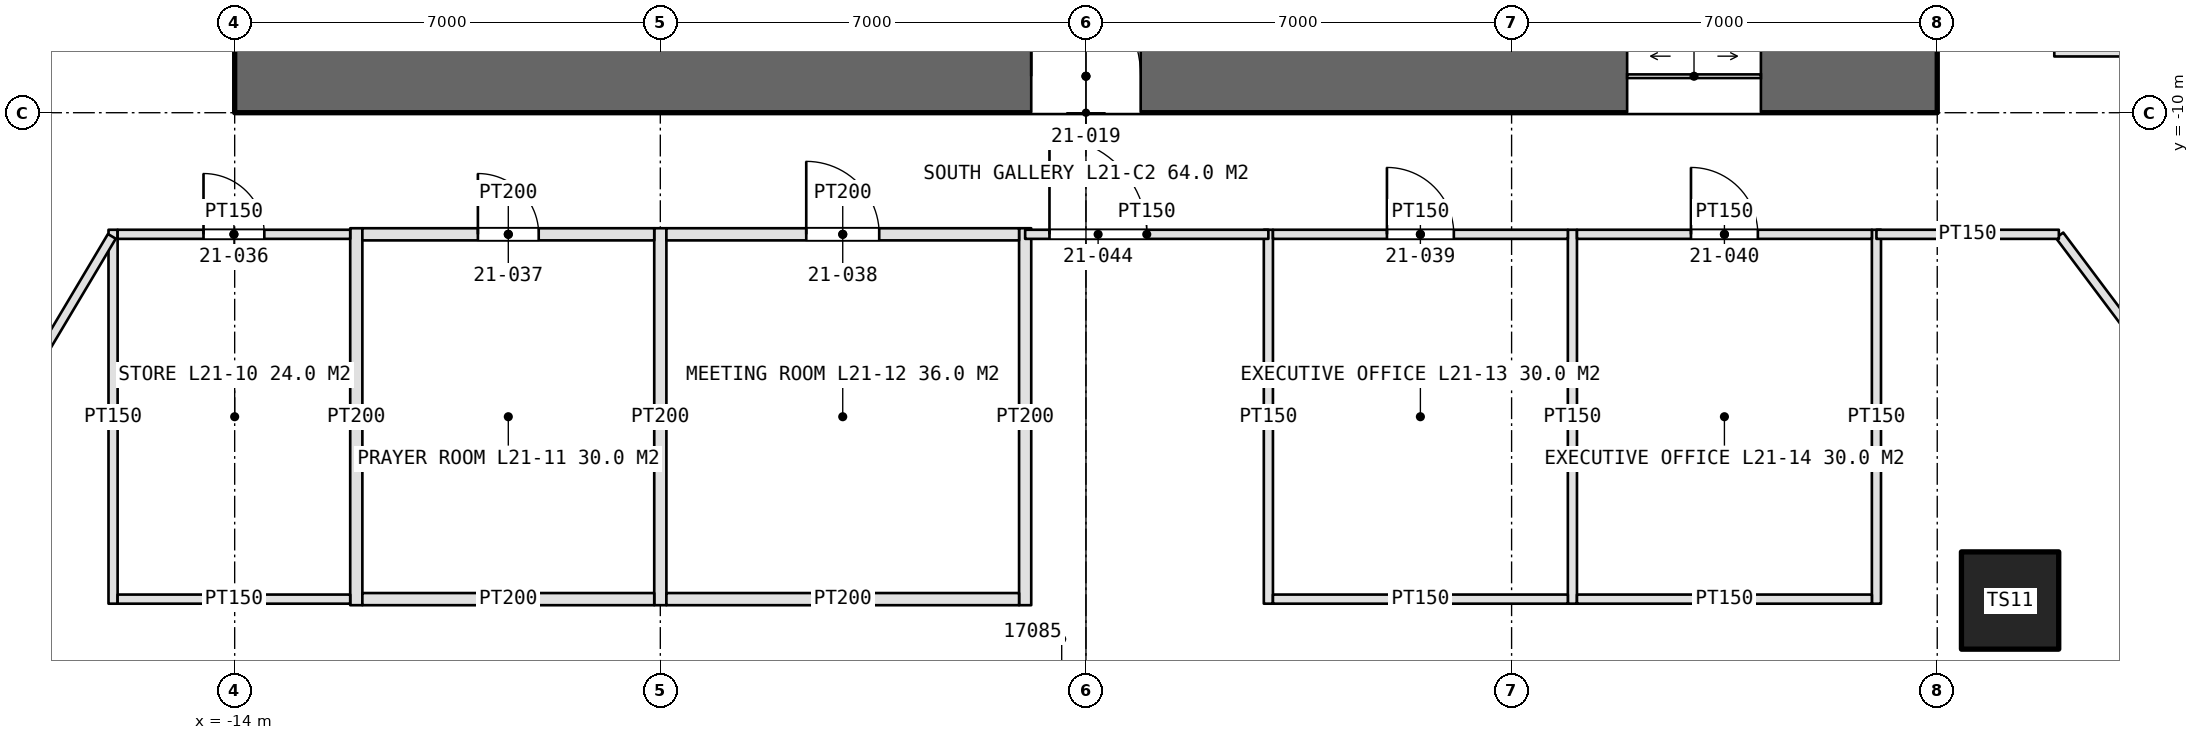
"""IFC4 building model, lengths in metres.
Left out: names, types, materials, properties, quantities, classifications, styles, units other than length and angle.
Written with IfcOpenShell. Run it as: python <this file> out.ifc"""

import sys

from ifc_helpers import new_model, si_unit, direction, frame, frame_2d, origin, origin_2d, place, context, subcontext, project, spatial, rectangle, hollow_rectangle, extrude, element, fill, save


model = new_model("IFC4")
c1 = context("Model", 3, precision=1e-05, world=origin(), true_north=direction((0.0, 1.0)))
c2 = subcontext(c1, "Body", "Model", "MODEL_VIEW")
j1 = project(units=[si_unit("LENGTHUNIT", "METRE"), si_unit("PLANEANGLEUNIT", "RADIAN")], contexts=[c1])
p1 = place(None, origin())
s1 = spatial("IfcSite", under=j1, at=p1, CompositionType="ELEMENT")
p2 = place(p1, origin())
s2 = spatial("IfcBuilding", under=s1, at=p2, CompositionType="ELEMENT")
p3 = place(p2, frame((0.0, 0.0, 105.0)))
s3 = spatial("IfcBuildingStorey", under=s2, at=p3, CompositionType="ELEMENT", Elevation=105.0)
p4 = place(p3, frame((-14.0, -9.4, 0.0), z_axis=(0.0, 0.0, 1.0), x_axis=(1.0, 0.0, 0.0)))
e1 = element("IfcWall", 1, at=p4, inside=s3, PredefinedType="SHEAR", context=c2, shape_type="SweptSolid", body=[
    extrude(rectangle(XDim=28.0, YDim=1.2, at=frame_2d((14.0, 0.0))), origin(), (0.0, 0.0, 1.0), 4.2),
])
p5 = place(p4, frame((13.1, 0.0, 0.0)))
e2 = element("IfcOpeningElement", 2, at=p5, cuts=e1, PredefinedType="OPENING", context=c2, shape_type="SweptSolid", body=[
    extrude(rectangle(XDim=1.8, YDim=2.4, at=frame_2d((0.9, 1.2))), frame((0.0, 0.61, 0.0), z_axis=(0.0, -1.0, 0.0), x_axis=(1.0, 0.0, 0.0)), (0.0, 0.0, 1.0), 1.22),
])
p6 = place(p4, frame((22.9, 0.0, 0.0)))
e3 = element("IfcOpeningElement", 3, at=p6, cuts=e1, PredefinedType="OPENING", context=c2, shape_type="SweptSolid", body=[
    extrude(rectangle(XDim=2.2, YDim=2.7, at=frame_2d((1.1, 1.35))), frame((0.0, 0.61, 0.0), z_axis=(0.0, -1.0, 0.0), x_axis=(1.0, 0.0, 0.0)), (0.0, 0.0, 1.0), 1.22),
])
p7 = place(p3, frame((15.198, -18.023, 0.975), z_axis=(0.0, 0.0, 1.0), x_axis=(1.0, 0.0, 0.0)))
e4 = element("IfcColumn", 4, at=p7, inside=s3, PredefinedType="COLUMN", context=c2, shape_type="SweptSolid", body=[
    extrude(hollow_rectangle(XDim=1.6, YDim=1.6, WallThickness=0.15, at=origin_2d()), origin(), (0.0, 0.0, 1.0), 3.225),
])
p8 = place(p3, frame((15.925, -9.0, 0.0), z_axis=(0.0, 0.0, 1.0), x_axis=(1.0, 0.0, 0.0)))
e5 = element("IfcWall", 5, at=p8, inside=s3, PredefinedType="PARTITIONING", context=c2, shape_type="SweptSolid", body=[
    extrude(rectangle(XDim=7.15, YDim=0.15, at=frame_2d((3.575, 0.0))), origin(), (0.0, 0.0, 1.0), 3.0),
])
p9 = place(p3, frame((-16.0, -11.925, 0.0), z_axis=(0.0, 0.0, 1.0), x_axis=(0.0, -1.0, 0.0)))
e6 = element("IfcWall", 6, at=p9, inside=s3, PredefinedType="PARTITIONING", context=c2, shape_type="SweptSolid", body=[
    extrude(rectangle(XDim=6.15, YDim=0.15, at=frame_2d((3.075, 0.0))), origin(), (0.0, 0.0, 1.0), 3.0),
])
for number, where, z_axis, x_axis in (
    (7, (-12.0, -11.9, 0.0), (0.0, 0.0, 1.0), (0.0, -1.0, 0.0)),
    (8, (-7.0, -11.9, 0.0), (0.0, 0.0, 1.0), (0.0, -1.0, 0.0)),
    (9, (-1.0, -11.9, 0.0), (0.0, 0.0, 1.0), (0.0, -1.0, 0.0)),
):
    element("IfcWall", number, at=place(p3, frame(where, z_axis=z_axis, x_axis=x_axis)), inside=s3, PredefinedType="PARTITIONING", context=c2, shape_type="SweptSolid", body=[
        extrude(rectangle(XDim=6.2, YDim=0.2, at=frame_2d((3.1, 0.0))), origin(), (0.0, 0.0, 1.0), 3.0),
    ])
p10 = place(p3, frame((-15.925, -12.0, 0.0), z_axis=(0.0, 0.0, 1.0), x_axis=(1.0, 0.0, 0.0)))
e10 = element("IfcWall", 10, at=p10, inside=s3, PredefinedType="PARTITIONING", context=c2, shape_type="SweptSolid", body=[
    extrude(rectangle(XDim=3.825, YDim=0.15, at=frame_2d((1.913, 0.0))), origin(), (0.0, 0.0, 1.0), 3.0),
])
p11 = place(p10, frame((1.413, 0.0, 0.0)))
e11 = element("IfcOpeningElement", 11, at=p11, cuts=e10, PredefinedType="OPENING", context=c2, shape_type="SweptSolid", body=[
    extrude(rectangle(XDim=1.0, YDim=2.2, at=frame_2d((0.5, 1.1))), frame((0.0, 0.085, 0.0), z_axis=(0.0, -1.0, 0.0), x_axis=(1.0, 0.0, 0.0)), (0.0, 0.0, 1.0), 0.17),
])
p12 = place(p3, frame((-15.925, -18.0, 0.0), z_axis=(0.0, 0.0, 1.0), x_axis=(1.0, 0.0, 0.0)))
e12 = element("IfcWall", 12, at=p12, inside=s3, PredefinedType="PARTITIONING", context=c2, shape_type="SweptSolid", body=[
    extrude(rectangle(XDim=3.825, YDim=0.15, at=frame_2d((1.913, 0.0))), origin(), (0.0, 0.0, 1.0), 3.0),
])
p13 = place(p3, frame((-11.9, -12.0, 0.0), z_axis=(0.0, 0.0, 1.0), x_axis=(1.0, 0.0, 0.0)))
e13 = element("IfcWall", 13, at=p13, inside=s3, PredefinedType="PARTITIONING", context=c2, shape_type="SweptSolid", body=[
    extrude(rectangle(XDim=4.8, YDim=0.2, at=frame_2d((2.4, 0.0))), origin(), (0.0, 0.0, 1.0), 3.0),
])
p14 = place(p13, frame((1.9, 0.0, 0.0)))
e14 = element("IfcOpeningElement", 14, at=p14, cuts=e13, PredefinedType="OPENING", context=c2, shape_type="SweptSolid", body=[
    extrude(rectangle(XDim=1.0, YDim=2.2, at=frame_2d((0.5, 1.1))), frame((0.0, 0.11, 0.0), z_axis=(0.0, -1.0, 0.0), x_axis=(1.0, 0.0, 0.0)), (0.0, 0.0, 1.0), 0.22),
])
p15 = place(p3, frame((-11.9, -18.0, 0.0), z_axis=(0.0, 0.0, 1.0), x_axis=(1.0, 0.0, 0.0)))
e15 = element("IfcWall", 15, at=p15, inside=s3, PredefinedType="PARTITIONING", context=c2, shape_type="SweptSolid", body=[
    extrude(rectangle(XDim=4.8, YDim=0.2, at=frame_2d((2.4, 0.0))), origin(), (0.0, 0.0, 1.0), 3.0),
])
p16 = place(p3, frame((-6.9, -12.0, 0.0), z_axis=(0.0, 0.0, 1.0), x_axis=(1.0, 0.0, 0.0)))
e16 = element("IfcWall", 16, at=p16, inside=s3, PredefinedType="PARTITIONING", context=c2, shape_type="SweptSolid", body=[
    extrude(rectangle(XDim=5.8, YDim=0.2, at=frame_2d((2.9, 0.0))), origin(), (0.0, 0.0, 1.0), 3.0),
])
p17 = place(p16, frame((2.3, 0.0, 0.0)))
e17 = element("IfcOpeningElement", 17, at=p17, cuts=e16, PredefinedType="OPENING", context=c2, shape_type="SweptSolid", body=[
    extrude(rectangle(XDim=1.2, YDim=2.4, at=frame_2d((0.6, 1.2))), frame((0.0, 0.11, 0.0), z_axis=(0.0, -1.0, 0.0), x_axis=(1.0, 0.0, 0.0)), (0.0, 0.0, 1.0), 0.22),
])
p18 = place(p3, frame((-6.9, -18.0, 0.0), z_axis=(0.0, 0.0, 1.0), x_axis=(1.0, 0.0, 0.0)))
e18 = element("IfcWall", 18, at=p18, inside=s3, PredefinedType="PARTITIONING", context=c2, shape_type="SweptSolid", body=[
    extrude(rectangle(XDim=5.8, YDim=0.2, at=frame_2d((2.9, 0.0))), origin(), (0.0, 0.0, 1.0), 3.0),
])
for number, where, z_axis, x_axis in (
    (19, (3.0, -11.925, 0.0), (0.0, 0.0, 1.0), (0.0, -1.0, 0.0)),
    (20, (8.0, -11.925, 0.0), (0.0, 0.0, 1.0), (0.0, -1.0, 0.0)),
    (21, (13.0, -11.925, 0.0), (0.0, 0.0, 1.0), (0.0, -1.0, 0.0)),
):
    element("IfcWall", number, at=place(p3, frame(where, z_axis=z_axis, x_axis=x_axis)), inside=s3, PredefinedType="PARTITIONING", context=c2, shape_type="SweptSolid", body=[
        extrude(rectangle(XDim=6.15, YDim=0.15, at=frame_2d((3.075, 0.0))), origin(), (0.0, 0.0, 1.0), 3.0),
    ])
p19 = place(p3, frame((3.075, -12.0, 0.0), z_axis=(0.0, 0.0, 1.0), x_axis=(1.0, 0.0, 0.0)))
e22 = element("IfcWall", 22, at=p19, inside=s3, PredefinedType="PARTITIONING", context=c2, shape_type="SweptSolid", body=[
    extrude(rectangle(XDim=4.85, YDim=0.15, at=frame_2d((2.425, 0.0))), origin(), (0.0, 0.0, 1.0), 3.0),
])
p20 = place(p19, frame((1.875, 0.0, 0.0)))
e23 = element("IfcOpeningElement", 23, at=p20, cuts=e22, PredefinedType="OPENING", context=c2, shape_type="SweptSolid", body=[
    extrude(rectangle(XDim=1.1, YDim=2.3, at=frame_2d((0.55, 1.15))), frame((0.0, 0.085, 0.0), z_axis=(0.0, -1.0, 0.0), x_axis=(1.0, 0.0, 0.0)), (0.0, 0.0, 1.0), 0.17),
])
p21 = place(p3, frame((3.075, -18.0, 0.0), z_axis=(0.0, 0.0, 1.0), x_axis=(1.0, 0.0, 0.0)))
e24 = element("IfcWall", 24, at=p21, inside=s3, PredefinedType="PARTITIONING", context=c2, shape_type="SweptSolid", body=[
    extrude(rectangle(XDim=4.85, YDim=0.15, at=frame_2d((2.425, 0.0))), origin(), (0.0, 0.0, 1.0), 3.0),
])
p22 = place(p3, frame((8.075, -12.0, 0.0), z_axis=(0.0, 0.0, 1.0), x_axis=(1.0, 0.0, 0.0)))
e25 = element("IfcWall", 25, at=p22, inside=s3, PredefinedType="PARTITIONING", context=c2, shape_type="SweptSolid", body=[
    extrude(rectangle(XDim=4.85, YDim=0.15, at=frame_2d((2.425, 0.0))), origin(), (0.0, 0.0, 1.0), 3.0),
])
p23 = place(p22, frame((1.875, 0.0, 0.0)))
e26 = element("IfcOpeningElement", 26, at=p23, cuts=e25, PredefinedType="OPENING", context=c2, shape_type="SweptSolid", body=[
    extrude(rectangle(XDim=1.1, YDim=2.3, at=frame_2d((0.55, 1.15))), frame((0.0, 0.085, 0.0), z_axis=(0.0, -1.0, 0.0), x_axis=(1.0, 0.0, 0.0)), (0.0, 0.0, 1.0), 0.17),
])
p24 = place(p3, frame((8.075, -18.0, 0.0), z_axis=(0.0, 0.0, 1.0), x_axis=(1.0, 0.0, 0.0)))
e27 = element("IfcWall", 27, at=p24, inside=s3, PredefinedType="PARTITIONING", context=c2, shape_type="SweptSolid", body=[
    extrude(rectangle(XDim=4.85, YDim=0.15, at=frame_2d((2.425, 0.0))), origin(), (0.0, 0.0, 1.0), 3.0),
])
p25 = place(p3, frame((-16.02, -12.034, 0.0), z_axis=(0.0, 0.0, 1.0), x_axis=(-0.511518902153, -0.859272024879, 0.0)))
e28 = element("IfcWall", 28, at=p25, inside=s3, PredefinedType="PARTITIONING", context=c2, shape_type="SweptSolid", body=[
    extrude(rectangle(XDim=8.451, YDim=0.15, at=frame_2d((4.226, 0.0))), origin(), (0.0, 0.0, 1.0), 3.0),
])
p26 = place(p3, frame((16.012, -12.016, 0.0), z_axis=(0.0, 0.0, 1.0), x_axis=(0.600059749679, -0.799955184254, 0.0)))
e29 = element("IfcWall", 29, at=p26, inside=s3, PredefinedType="PARTITIONING", context=c2, shape_type="SweptSolid", body=[
    extrude(rectangle(XDim=7.191, YDim=0.15, at=frame_2d((3.596, 0.0))), origin(), (0.0, 0.0, 1.0), 3.0),
])
p27 = place(p3, frame((-1.0, -12.0, 0.0), z_axis=(0.0, 0.0, 1.0), x_axis=(1.0, 0.0, 0.0)))
e30 = element("IfcWall", 30, at=p27, inside=s3, PredefinedType="PARTITIONING", context=c2, shape_type="SweptSolid", body=[
    extrude(rectangle(XDim=4.0, YDim=0.15, at=frame_2d((2.0, 0.0))), origin(), (0.0, 0.0, 1.0), 3.0),
])
p28 = place(p27, frame((0.4, 0.0, 0.0)))
e31 = element("IfcOpeningElement", 31, at=p28, cuts=e30, PredefinedType="OPENING", context=c2, shape_type="SweptSolid", body=[
    extrude(rectangle(XDim=1.6, YDim=2.4, at=frame_2d((0.8, 1.2))), frame((0.0, 0.085, 0.0), z_axis=(0.0, -1.0, 0.0), x_axis=(1.0, 0.0, 0.0)), (0.0, 0.0, 1.0), 0.17),
])
p29 = place(p3, frame((13.0, -12.0, 0.0), z_axis=(0.0, 0.0, 1.0), x_axis=(1.0, 0.0, 0.0)))
e32 = element("IfcWall", 32, at=p29, inside=s3, PredefinedType="PARTITIONING", context=c2, shape_type="SweptSolid", body=[
    extrude(rectangle(XDim=3.0, YDim=0.15, at=frame_2d((1.5, 0.0))), origin(), (0.0, 0.0, 1.0), 3.0),
])
p30 = place(p5, origin())
e33 = element("IfcDoor", 33, at=p30, inside=s3, OperationType="DOUBLE_DOOR_SINGLE_SWING", PredefinedType="DOOR", context=c2, shape_type="SweptSolid", body=[
    extrude(rectangle(XDim=1.8, YDim=2.4, at=frame_2d((0.9, 1.2))), frame((0.0, 0.025, 0.0), z_axis=(0.0, -1.0, 0.0), x_axis=(1.0, 0.0, 0.0)), (0.0, 0.0, 1.0), 0.05),
])
fill(e2, e33)
p31 = place(p6, origin())
e34 = element("IfcDoor", 34, at=p31, inside=s3, OperationType="DOUBLE_DOOR_SLIDING", PredefinedType="DOOR", context=c2, shape_type="SweptSolid", body=[
    extrude(rectangle(XDim=2.2, YDim=2.7, at=frame_2d((1.1, 1.35))), frame((0.0, 0.025, 0.0), z_axis=(0.0, -1.0, 0.0), x_axis=(1.0, 0.0, 0.0)), (0.0, 0.0, 1.0), 0.05),
])
fill(e3, e34)
p32 = place(p11, origin())
e35 = element("IfcDoor", 35, at=p32, inside=s3, OperationType="SINGLE_SWING_LEFT", PredefinedType="DOOR", context=c2, shape_type="SweptSolid", body=[
    extrude(rectangle(XDim=1.0, YDim=2.2, at=frame_2d((0.5, 1.1))), frame((0.0, 0.025, 0.0), z_axis=(0.0, -1.0, 0.0), x_axis=(1.0, 0.0, 0.0)), (0.0, 0.0, 1.0), 0.05),
])
fill(e11, e35)
p33 = place(p14, origin())
e36 = element("IfcDoor", 36, at=p33, inside=s3, OperationType="SINGLE_SWING_LEFT", PredefinedType="DOOR", context=c2, shape_type="SweptSolid", body=[
    extrude(rectangle(XDim=1.0, YDim=2.2, at=frame_2d((0.5, 1.1))), frame((0.0, 0.025, 0.0), z_axis=(0.0, -1.0, 0.0), x_axis=(1.0, 0.0, 0.0)), (0.0, 0.0, 1.0), 0.05),
])
fill(e14, e36)
p34 = place(p17, origin())
e37 = element("IfcDoor", 37, at=p34, inside=s3, OperationType="SINGLE_SWING_LEFT", PredefinedType="DOOR", context=c2, shape_type="SweptSolid", body=[
    extrude(rectangle(XDim=1.2, YDim=2.4, at=frame_2d((0.6, 1.2))), frame((0.0, 0.025, 0.0), z_axis=(0.0, -1.0, 0.0), x_axis=(1.0, 0.0, 0.0)), (0.0, 0.0, 1.0), 0.05),
])
fill(e17, e37)
p35 = place(p20, origin())
e38 = element("IfcDoor", 38, at=p35, inside=s3, OperationType="SINGLE_SWING_LEFT", PredefinedType="DOOR", context=c2, shape_type="SweptSolid", body=[
    extrude(rectangle(XDim=1.1, YDim=2.3, at=frame_2d((0.55, 1.15))), frame((0.0, 0.025, 0.0), z_axis=(0.0, -1.0, 0.0), x_axis=(1.0, 0.0, 0.0)), (0.0, 0.0, 1.0), 0.05),
])
fill(e23, e38)
p36 = place(p23, origin())
e39 = element("IfcDoor", 39, at=p36, inside=s3, OperationType="SINGLE_SWING_LEFT", PredefinedType="DOOR", context=c2, shape_type="SweptSolid", body=[
    extrude(rectangle(XDim=1.1, YDim=2.3, at=frame_2d((0.55, 1.15))), frame((0.0, 0.025, 0.0), z_axis=(0.0, -1.0, 0.0), x_axis=(1.0, 0.0, 0.0)), (0.0, 0.0, 1.0), 0.05),
])
fill(e26, e39)
p37 = place(p28, origin())
e40 = element("IfcDoor", 40, at=p37, inside=s3, OperationType="DOUBLE_DOOR_SINGLE_SWING", PredefinedType="DOOR", context=c2, shape_type="SweptSolid", body=[
    extrude(rectangle(XDim=1.6, YDim=2.4, at=frame_2d((0.8, 1.2))), frame((0.0, 0.025, 0.0), z_axis=(0.0, -1.0, 0.0), x_axis=(1.0, 0.0, 0.0)), (0.0, 0.0, 1.0), 0.05),
])
fill(e31, e40)
save(model, sys.argv[1])
